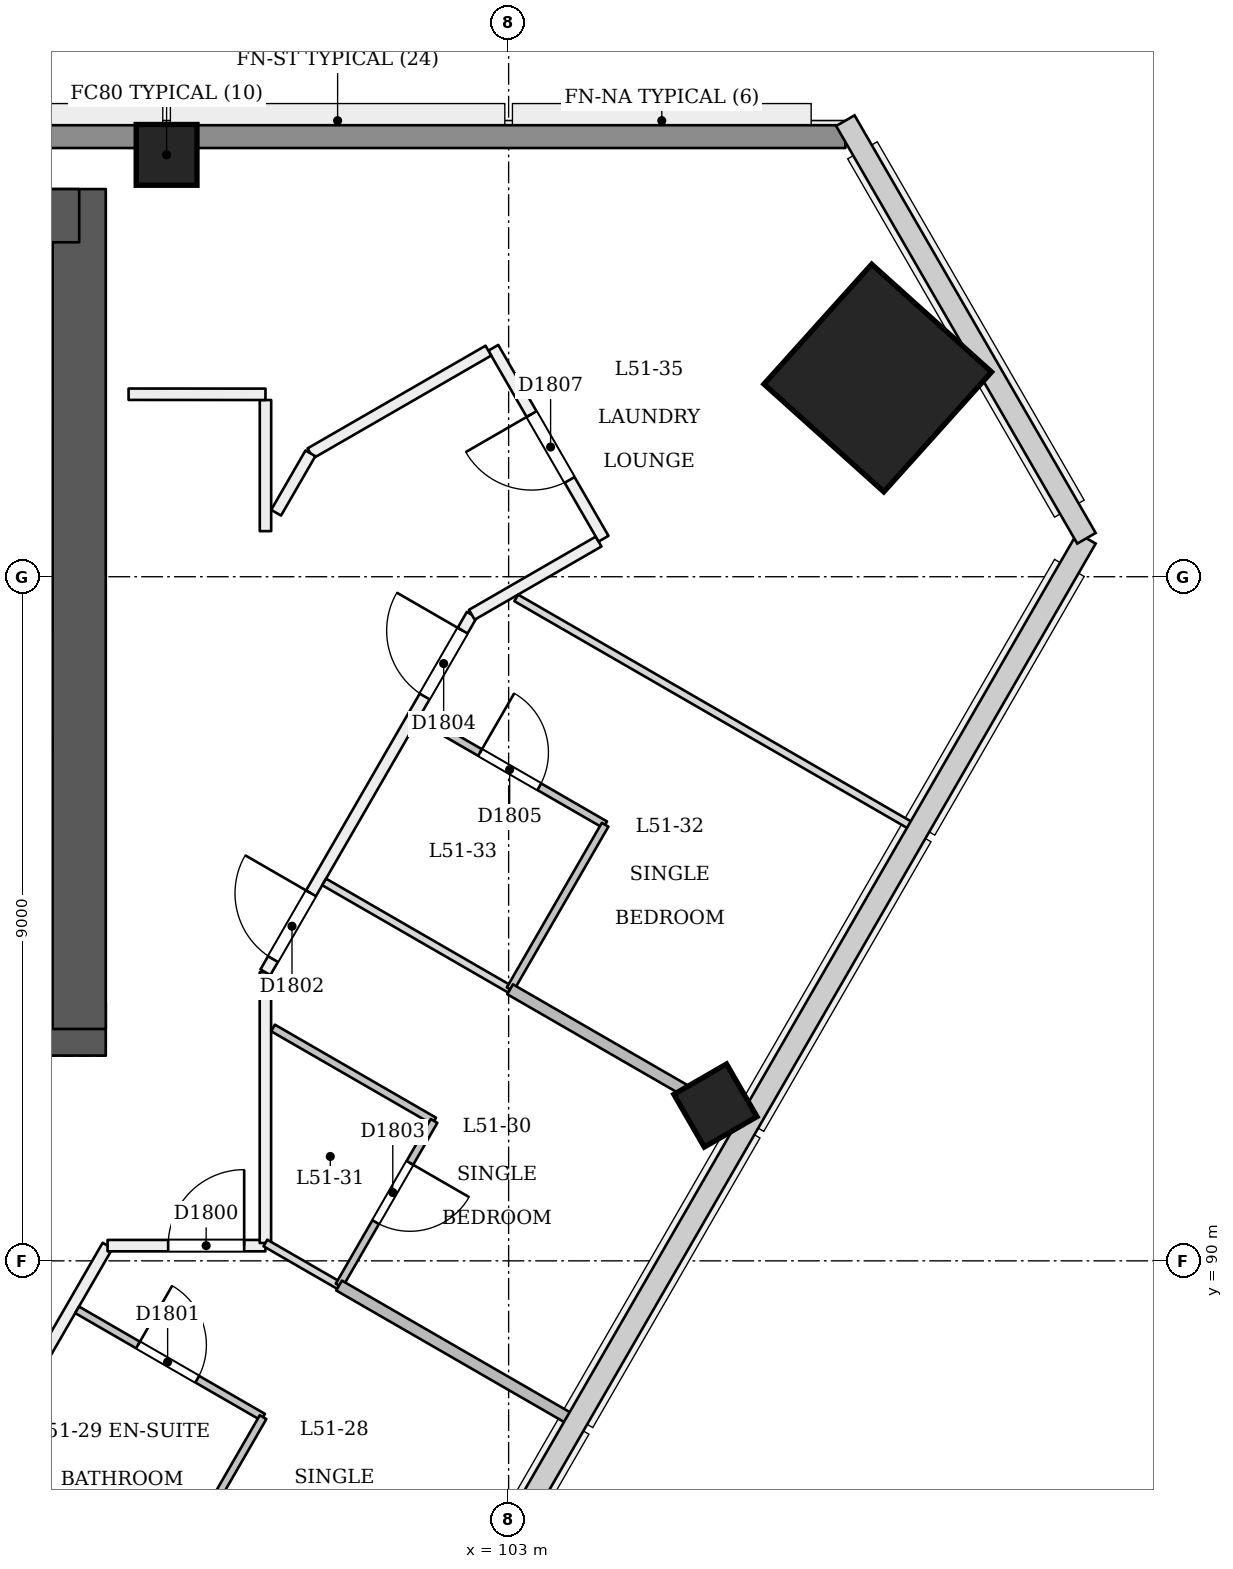
"""IFC4 building model, lengths in metres.
Left out: names, types, materials, properties, quantities, classifications, styles, units other than length and angle.
Written with IfcOpenShell. Run it as: python <this file> out.ifc"""

import sys

from ifc_helpers import new_model, si_unit, direction, frame, frame_2d, origin, origin_2d, place, context, subcontext, project, spatial, rectangle, extrude, element, fill, save


model = new_model("IFC4")
c1 = context("Model", 3, precision=1e-05, world=origin(), true_north=direction((0.0, 1.0)))
c2 = subcontext(c1, "Body", "Model", "MODEL_VIEW")
j1 = project(units=[si_unit("LENGTHUNIT", "METRE"), si_unit("PLANEANGLEUNIT", "RADIAN")], contexts=[c1])
p1 = place(None, origin())
s1 = spatial("IfcSite", under=j1, at=p1, CompositionType="ELEMENT")
p2 = place(p1, origin())
s2 = spatial("IfcBuilding", under=s1, at=p2, CompositionType="ELEMENT")
p3 = place(p2, frame((0.0, 0.0, 198.0)))
s3 = spatial("IfcBuildingStorey", under=s2, at=p3, CompositionType="ELEMENT", Elevation=198.0)
p4 = place(p3, frame((72.65, 93.05, 0.0), z_axis=(0.0, 0.0, 1.0), x_axis=(1.0, 0.0, 0.0)))
e1 = element("IfcWall", 1, at=p4, inside=s3, PredefinedType="SHEAR", context=c2, shape_type="SweptSolid", body=[
    extrude(rectangle(XDim=25.05, YDim=0.7, at=frame_2d((12.525, 0.0))), origin(), (0.0, 0.0, 1.0), 3.6),
])
p5 = place(p4, frame((1.15, 0.0, 0.0)))
e2 = element("IfcOpeningElement", 2, at=p5, cuts=e1, PredefinedType="OPENING", context=c2, shape_type="SweptSolid", body=[
    extrude(rectangle(XDim=1.2, YDim=2.1, at=frame_2d((0.6, 1.05))), frame((0.0, 0.36, 0.0), z_axis=(0.0, -1.0, 0.0), x_axis=(1.0, 0.0, 0.0)), (0.0, 0.0, 1.0), 0.721),
])
p6 = place(p4, frame((3.35, 0.0, 0.0)))
e3 = element("IfcOpeningElement", 3, at=p6, cuts=e1, PredefinedType="OPENING", context=c2, shape_type="SweptSolid", body=[
    extrude(rectangle(XDim=1.2, YDim=2.1, at=frame_2d((0.6, 1.05))), frame((0.0, 0.36, 0.0), z_axis=(0.0, -1.0, 0.0), x_axis=(1.0, 0.0, 0.0)), (0.0, 0.0, 1.0), 0.721),
])
p7 = place(p4, frame((13.35, 0.0, 0.0)))
e4 = element("IfcOpeningElement", 4, at=p7, cuts=e1, PredefinedType="OPENING", context=c2, shape_type="SweptSolid", body=[
    extrude(rectangle(XDim=1.2, YDim=2.1, at=frame_2d((0.6, 1.05))), frame((0.0, 0.36, 0.0), z_axis=(0.0, -1.0, 0.0), x_axis=(1.0, 0.0, 0.0)), (0.0, 0.0, 1.0), 0.721),
])
p8 = place(p4, frame((15.812, 0.0, 0.0)))
e5 = element("IfcOpeningElement", 5, at=p8, cuts=e1, PredefinedType="OPENING", context=c2, shape_type="SweptSolid", body=[
    extrude(rectangle(XDim=1.0, YDim=2.1, at=frame_2d((0.5, 1.05))), frame((0.0, 0.36, 0.0), z_axis=(0.0, -1.0, 0.0), x_axis=(1.0, 0.0, 0.0)), (0.0, 0.0, 1.0), 0.721),
])
p9 = place(p4, frame((18.25, 0.0, 0.0)))
e6 = element("IfcOpeningElement", 6, at=p9, cuts=e1, PredefinedType="OPENING", context=c2, shape_type="SweptSolid", body=[
    extrude(rectangle(XDim=1.0, YDim=2.1, at=frame_2d((0.5, 1.05))), frame((0.0, 0.36, 0.0), z_axis=(0.0, -1.0, 0.0), x_axis=(1.0, 0.0, 0.0)), (0.0, 0.0, 1.0), 0.721),
])
p10 = place(p4, frame((20.6, 0.0, 0.0)))
e7 = element("IfcOpeningElement", 7, at=p10, cuts=e1, PredefinedType="OPENING", context=c2, shape_type="SweptSolid", body=[
    extrude(rectangle(XDim=1.0, YDim=2.1, at=frame_2d((0.5, 1.05))), frame((0.0, 0.36, 0.0), z_axis=(0.0, -1.0, 0.0), x_axis=(1.0, 0.0, 0.0)), (0.0, 0.0, 1.0), 0.721),
])
p11 = place(p4, frame((22.887, 0.0, 0.0)))
e8 = element("IfcOpeningElement", 8, at=p11, cuts=e1, PredefinedType="OPENING", context=c2, shape_type="SweptSolid", body=[
    extrude(rectangle(XDim=1.0, YDim=2.1, at=frame_2d((0.5, 1.05))), frame((0.0, 0.36, 0.0), z_axis=(0.0, -1.0, 0.0), x_axis=(1.0, 0.0, 0.0)), (0.0, 0.0, 1.0), 0.721),
])
p12 = place(p3, frame((97.35, 93.05, 0.0), z_axis=(0.0, 0.0, 1.0), x_axis=(0.0, 1.0, 0.0)))
e9 = element("IfcWall", 9, at=p12, inside=s3, PredefinedType="SHEAR", context=c2, shape_type="SweptSolid", body=[
    extrude(rectangle(XDim=11.05, YDim=0.7, at=frame_2d((5.525, 0.0))), origin(), (0.0, 0.0, 1.0), 3.6),
])
p13 = place(p3, frame((97.35, 103.75, 0.0), z_axis=(0.0, 0.0, 1.0), x_axis=(-1.0, 0.0, 0.0)))
e10 = element("IfcWall", 10, at=p13, inside=s3, PredefinedType="SHEAR", context=c2, shape_type="SweptSolid", body=[
    extrude(rectangle(XDim=25.05, YDim=0.7, at=frame_2d((12.525, 0.0))), origin(), (0.0, 0.0, 1.0), 3.6),
])
p14 = place(p3, frame((107.89, 101.603, 0.0), z_axis=(-0.028401814599, 0.009218727412, 0.999554076572), x_axis=(0.50075235184, -0.865305630254, 0.022209195791)))
e11 = element("IfcColumn", 11, at=p14, inside=s3, PredefinedType="COLUMN", context=c2, shape_type="SweptSolid", body=[
    extrude(rectangle(XDim=2.12, YDim=2.12, at=origin_2d()), origin(), (0.0, 0.0, 1.0), 3.602),
])
p15 = place(p3, frame((98.5, 104.55, 0.0), z_axis=(0.0, 0.0, 1.0), x_axis=(1.0, 0.0, 0.0)))
e12 = element("IfcColumn", 12, at=p15, inside=s3, PredefinedType="COLUMN", context=c2, shape_type="SweptSolid", body=[
    extrude(rectangle(XDim=0.8, YDim=0.8, at=origin_2d()), origin(), (0.0, 0.0, 1.0), 3.6),
])
p16 = place(p3, frame((105.748, 91.996, -0.024), z_axis=(-0.022155133694, 0.038483534979, 0.999013597298), x_axis=(-0.501312932815, -0.864981144328, 0.022202777955)))
e13 = element("IfcColumn", 13, at=p16, inside=s3, PredefinedType="COLUMN", context=c2, shape_type="SweptSolid", body=[
    extrude(rectangle(XDim=0.8, YDim=0.8, at=origin_2d()), origin(), (0.0, 0.0, 1.0), 3.604),
])
p17 = place(p3, frame((85.758, 69.475, 0.0), z_axis=(0.0, 0.0, 1.0), x_axis=(0.500001211172, 0.866024704513, 0.0)))
e14 = element("IfcWall", 14, at=p17, inside=s3, PredefinedType="PARTITIONING", context=c2, shape_type="SweptSolid", body=[
    extrude(rectangle(XDim=23.932, YDim=0.15, at=frame_2d((11.966, 0.0))), origin(), (0.0, 0.0, 1.0), 2.75),
])
p18 = place(p17, frame((5.395, 0.0, 0.0)))
e15 = element("IfcOpeningElement", 15, at=p18, cuts=e14, PredefinedType="OPENING", context=c2, shape_type="SweptSolid", body=[
    extrude(rectangle(XDim=1.0, YDim=2.1, at=frame_2d((0.5, 1.05))), frame((0.0, 0.085, 0.0), z_axis=(0.0, -1.0, 0.0), x_axis=(1.0, 0.0, 0.0)), (0.0, 0.0, 1.0), 0.171),
])
p19 = place(p17, frame((7.72, 0.0, 0.0)))
e16 = element("IfcOpeningElement", 16, at=p19, cuts=e14, PredefinedType="OPENING", context=c2, shape_type="SweptSolid", body=[
    extrude(rectangle(XDim=1.0, YDim=2.1, at=frame_2d((0.5, 1.05))), frame((0.0, 0.085, 0.0), z_axis=(0.0, -1.0, 0.0), x_axis=(1.0, 0.0, 0.0)), (0.0, 0.0, 1.0), 0.171),
])
p20 = place(p17, frame((14.28, 0.0, 0.0)))
e17 = element("IfcOpeningElement", 17, at=p20, cuts=e14, PredefinedType="OPENING", context=c2, shape_type="SweptSolid", body=[
    extrude(rectangle(XDim=1.0, YDim=2.1, at=frame_2d((0.5, 1.05))), frame((0.0, 0.085, 0.0), z_axis=(0.0, -1.0, 0.0), x_axis=(1.0, 0.0, 0.0)), (0.0, 0.0, 1.0), 0.171),
])
p21 = place(p17, frame((16.605, 0.0, 0.0)))
e18 = element("IfcOpeningElement", 18, at=p21, cuts=e14, PredefinedType="OPENING", context=c2, shape_type="SweptSolid", body=[
    extrude(rectangle(XDim=1.0, YDim=2.1, at=frame_2d((0.5, 1.05))), frame((0.0, 0.085, 0.0), z_axis=(0.0, -1.0, 0.0), x_axis=(1.0, 0.0, 0.0)), (0.0, 0.0, 1.0), 0.171),
])
p22 = place(p3, frame((97.724, 90.2, 0.0), z_axis=(0.0, 0.0, 1.0), x_axis=(1.0, 0.0, 0.0)))
e19 = element("IfcWall", 19, at=p22, inside=s3, PredefinedType="PARTITIONING", context=c2, shape_type="SweptSolid", body=[
    extrude(rectangle(XDim=2.076, YDim=0.15, at=frame_2d((1.038, 0.0))), origin(), (0.0, 0.0, 1.0), 3.15),
])
p23 = place(p22, frame((0.797, 0.0, 0.0)))
e20 = element("IfcOpeningElement", 20, at=p23, cuts=e19, PredefinedType="OPENING", context=c2, shape_type="SweptSolid", body=[
    extrude(rectangle(XDim=1.0, YDim=2.1, at=frame_2d((0.5, 1.05))), frame((0.0, 0.085, 0.0), z_axis=(0.0, -1.0, 0.0), x_axis=(1.0, 0.0, 0.0)), (0.0, 0.0, 1.0), 0.171),
])
p24 = place(p3, frame((99.8, 90.235, 0.0), z_axis=(0.0, 0.0, 1.0), x_axis=(0.0, 1.0, 0.0)))
e21 = element("IfcWall", 21, at=p24, inside=s3, PredefinedType="PARTITIONING", context=c2, shape_type="SweptSolid", body=[
    extrude(rectangle(XDim=3.561, YDim=0.15, at=frame_2d((1.781, 0.0))), origin(), (0.0, 0.0, 1.0), 3.15),
])
p25 = place(p3, frame((99.8, 93.796, 0.0), z_axis=(0.0, 0.0, 1.0), x_axis=(0.499972772639, 0.866041122938, 0.0)))
e22 = element("IfcWall", 22, at=p25, inside=s3, PredefinedType="PARTITIONING", context=c2, shape_type="SweptSolid", body=[
    extrude(rectangle(XDim=5.431, YDim=0.15, at=frame_2d((2.716, 0.0))), origin(), (0.0, 0.0, 1.0), 3.15),
])
p26 = place(p25, frame((0.2, 0.0, 0.0)))
e23 = element("IfcOpeningElement", 23, at=p26, cuts=e22, PredefinedType="OPENING", context=c2, shape_type="SweptSolid", body=[
    extrude(rectangle(XDim=1.0, YDim=2.1, at=frame_2d((0.5, 1.05))), frame((0.0, 0.085, 0.0), z_axis=(0.0, -1.0, 0.0), x_axis=(1.0, 0.0, 0.0)), (0.0, 0.0, 1.0), 0.171),
])
p27 = place(p25, frame((4.19, 0.0, 0.0)))
e24 = element("IfcOpeningElement", 24, at=p27, cuts=e22, PredefinedType="OPENING", context=c2, shape_type="SweptSolid", body=[
    extrude(rectangle(XDim=1.0, YDim=2.1, at=frame_2d((0.5, 1.05))), frame((0.0, 0.085, 0.0), z_axis=(0.0, -1.0, 0.0), x_axis=(1.0, 0.0, 0.0)), (0.0, 0.0, 1.0), 0.171),
])
p28 = place(p3, frame((102.516, 98.5, 0.0), z_axis=(0.0, 0.0, 1.0), x_axis=(0.86605048973, 0.49995654735, 0.0)))
e25 = element("IfcWall", 25, at=p28, inside=s3, PredefinedType="PARTITIONING", context=c2, shape_type="SweptSolid", body=[
    extrude(rectangle(XDim=1.926, YDim=0.15, at=frame_2d((0.963, 0.0))), origin(), (0.0, 0.0, 1.0), 3.15),
])
p29 = place(p3, frame((104.249, 99.5, 0.0), z_axis=(0.0, 0.0, 1.0), x_axis=(-0.499987231761, 0.866032775405, 0.0)))
e26 = element("IfcWall", 26, at=p29, inside=s3, PredefinedType="PARTITIONING", context=c2, shape_type="SweptSolid", body=[
    extrude(rectangle(XDim=2.9, YDim=0.15, at=frame_2d((1.45, 0.0))), origin(), (0.0, 0.0, 1.0), 3.15),
])
p30 = place(p29, frame((0.893, 0.0, 0.0)))
e27 = element("IfcOpeningElement", 27, at=p30, cuts=e26, PredefinedType="OPENING", context=c2, shape_type="SweptSolid", body=[
    extrude(rectangle(XDim=1.0, YDim=2.1, at=frame_2d((0.5, 1.05))), frame((0.0, 0.085, 0.0), z_axis=(0.0, -1.0, 0.0), x_axis=(1.0, 0.0, 0.0)), (0.0, 0.0, 1.0), 0.171),
])
p31 = place(p3, frame((102.734, 101.975, 0.0), z_axis=(0.0, 0.0, 1.0), x_axis=(-0.866173556431, -0.499743304247, 0.0)))
e28 = element("IfcWall", 28, at=p31, inside=s3, PredefinedType="PARTITIONING", context=c2, shape_type="SweptSolid", body=[
    extrude(rectangle(XDim=2.703, YDim=0.15, at=frame_2d((1.352, 0.0))), origin(), (0.0, 0.0, 1.0), 3.15),
])
p32 = place(p3, frame((100.392, 100.624, 0.0), z_axis=(0.0, 0.0, 1.0), x_axis=(-0.500182949555, -0.865919752041, 0.0)))
e29 = element("IfcWall", 29, at=p32, inside=s3, PredefinedType="PARTITIONING", context=c2, shape_type="SweptSolid", body=[
    extrude(rectangle(XDim=0.903, YDim=0.15, at=frame_2d((0.451, 0.0))), origin(), (0.0, 0.0, 1.0), 3.15),
])
p33 = place(p3, frame((99.801, 99.6, 0.0), z_axis=(0.0, 0.0, 1.0), x_axis=(0.0, 1.0, 0.0)))
e30 = element("IfcWall", 30, at=p33, inside=s3, PredefinedType="PARTITIONING", context=c2, shape_type="SweptSolid", body=[
    extrude(rectangle(XDim=1.725, YDim=0.15, at=frame_2d((0.863, 0.0))), origin(), (0.0, 0.0, 1.0), 3.15),
])
p34 = place(p3, frame((99.801, 101.4, 0.0), z_axis=(0.0, 0.0, 1.0), x_axis=(-0.999999852996, 0.000542225757, 0.0)))
e31 = element("IfcWall", 31, at=p34, inside=s3, PredefinedType="PARTITIONING", context=c2, shape_type="SweptSolid", body=[
    extrude(rectangle(XDim=1.801, YDim=0.15, at=frame_2d((0.9, 0.0))), origin(), (0.0, 0.0, 1.0), 3.15),
])
p35 = place(p3, frame((98.519, 85.778, 0.0), z_axis=(0.0, 0.0, 1.0), x_axis=(-0.866011447264, 0.500024172624, 0.0)))
e32 = element("IfcWall", 32, at=p35, inside=s3, PredefinedType="PARTITIONING", context=c2, shape_type="SweptSolid", body=[
    extrude(rectangle(XDim=2.825, YDim=0.1, at=frame_2d((1.413, 0.0))), origin(), (0.0, 0.0, 1.0), 2.75),
])
p36 = place(p3, frame((97.323, 89.356, 0.0), z_axis=(0.0, 0.0, 1.0), x_axis=(0.866011447264, -0.500024172624, 0.0)))
e33 = element("IfcWall", 33, at=p36, inside=s3, PredefinedType="PARTITIONING", context=c2, shape_type="SweptSolid", body=[
    extrude(rectangle(XDim=2.825, YDim=0.1, at=frame_2d((1.413, 0.0))), origin(), (0.0, 0.0, 1.0), 3.15),
])
p37 = place(p36, frame((0.925, 0.0, 0.0)))
e34 = element("IfcOpeningElement", 34, at=p37, cuts=e33, PredefinedType="OPENING", context=c2, shape_type="SweptSolid", body=[
    extrude(rectangle(XDim=0.9, YDim=2.1, at=frame_2d((0.45, 1.05))), frame((0.0, 0.061, 0.0), z_axis=(0.0, -1.0, 0.0), x_axis=(1.0, 0.0, 0.0)), (0.0, 0.0, 1.0), 0.121),
])
p38 = place(p3, frame((99.769, 87.943, 0.0), z_axis=(0.0, 0.0, 1.0), x_axis=(-0.500004234368, -0.866022959057, 0.0)))
e35 = element("IfcWall", 35, at=p38, inside=s3, PredefinedType="PARTITIONING", context=c2, shape_type="SweptSolid", body=[
    extrude(rectangle(XDim=2.5, YDim=0.1, at=frame_2d((1.25, 0.0))), origin(), (0.0, 0.0, 1.0), 2.75),
])
p39 = place(p3, frame((103.818, 87.915, 0.0), z_axis=(0.0, 0.0, 1.0), x_axis=(-0.866036599697, 0.499980607609, 0.0)))
e36 = element("IfcWall", 36, at=p39, inside=s3, PredefinedType="PARTITIONING", context=c2, shape_type="SweptSolid", body=[
    extrude(rectangle(XDim=3.52, YDim=0.15, at=frame_2d((1.76, 0.0))), origin(), (0.0, 0.0, 1.0), 2.65),
])
p40 = place(p3, frame((100.769, 89.675, 0.0), z_axis=(0.0, 0.0, 1.0), x_axis=(-0.865938551386, 0.500150402602, 0.0)))
e37 = element("IfcWall", 37, at=p40, inside=s3, PredefinedType="PARTITIONING", context=c2, shape_type="SweptSolid", body=[
    extrude(rectangle(XDim=1.119, YDim=0.1, at=frame_2d((0.56, 0.0))), origin(), (0.0, 0.0, 1.0), 3.15),
])
p41 = place(p3, frame((99.9, 93.064, 0.0), z_axis=(0.0, 0.0, 1.0), x_axis=(0.866067636663, -0.499926843373, 0.0)))
e38 = element("IfcWall", 38, at=p41, inside=s3, PredefinedType="PARTITIONING", context=c2, shape_type="SweptSolid", body=[
    extrude(rectangle(XDim=2.447, YDim=0.1, at=frame_2d((1.224, 0.0))), origin(), (0.0, 0.0, 1.0), 3.15),
])
p42 = place(p3, frame((102.019, 91.84, 0.0), z_axis=(0.0, 0.0, 1.0), x_axis=(-0.499961950354, -0.866047370643, 0.0)))
e39 = element("IfcWall", 39, at=p42, inside=s3, PredefinedType="PARTITIONING", context=c2, shape_type="SweptSolid", body=[
    extrude(rectangle(XDim=2.5, YDim=0.1, at=frame_2d((1.25, 0.0))), origin(), (0.0, 0.0, 1.0), 3.15),
])
p43 = place(p42, frame((0.637, 0.0, 0.0)))
e40 = element("IfcOpeningElement", 40, at=p43, cuts=e39, PredefinedType="OPENING", context=c2, shape_type="SweptSolid", body=[
    extrude(rectangle(XDim=0.9, YDim=2.1, at=frame_2d((0.45, 1.05))), frame((0.0, 0.061, 0.0), z_axis=(0.0, -1.0, 0.0), x_axis=(1.0, 0.0, 0.0)), (0.0, 0.0, 1.0), 0.121),
])
p44 = place(p3, frame((106.051, 91.822, 0.0), z_axis=(0.0, 0.0, 1.0), x_axis=(-0.866036909293, 0.499980071345, 0.0)))
e41 = element("IfcWall", 41, at=p44, inside=s3, PredefinedType="PARTITIONING", context=c2, shape_type="SweptSolid", body=[
    extrude(rectangle(XDim=3.5, YDim=0.15, at=frame_2d((1.75, 0.0))), origin(), (0.0, 0.0, 1.0), 2.65),
])
p45 = place(p3, frame((103.019, 93.572, 0.0), z_axis=(0.0, 0.0, 1.0), x_axis=(-0.866011447264, 0.500024172624, 0.0)))
e42 = element("IfcWall", 42, at=p45, inside=s3, PredefinedType="PARTITIONING", context=c2, shape_type="SweptSolid", body=[
    extrude(rectangle(XDim=2.825, YDim=0.1, at=frame_2d((1.413, 0.0))), origin(), (0.0, 0.0, 1.0), 3.15),
])
p46 = place(p3, frame((101.823, 97.15, 0.0), z_axis=(0.0, 0.0, 1.0), x_axis=(0.866011447264, -0.500024172624, 0.0)))
e43 = element("IfcWall", 43, at=p46, inside=s3, PredefinedType="PARTITIONING", context=c2, shape_type="SweptSolid", body=[
    extrude(rectangle(XDim=2.825, YDim=0.1, at=frame_2d((1.413, 0.0))), origin(), (0.0, 0.0, 1.0), 3.15),
])
p47 = place(p46, frame((0.925, 0.0, 0.0)))
e44 = element("IfcOpeningElement", 44, at=p47, cuts=e43, PredefinedType="OPENING", context=c2, shape_type="SweptSolid", body=[
    extrude(rectangle(XDim=0.9, YDim=2.1, at=frame_2d((0.45, 1.05))), frame((0.0, 0.061, 0.0), z_axis=(0.0, -1.0, 0.0), x_axis=(1.0, 0.0, 0.0)), (0.0, 0.0, 1.0), 0.121),
])
p48 = place(p3, frame((104.269, 95.737, 0.0), z_axis=(0.0, 0.0, 1.0), x_axis=(-0.500004234368, -0.866022959057, 0.0)))
e45 = element("IfcWall", 45, at=p48, inside=s3, PredefinedType="PARTITIONING", context=c2, shape_type="SweptSolid", body=[
    extrude(rectangle(XDim=2.5, YDim=0.1, at=frame_2d((1.25, 0.0))), origin(), (0.0, 0.0, 1.0), 3.15),
])
p49 = place(p3, frame((108.318, 95.709, 0.0), z_axis=(0.0, 0.0, 1.0), x_axis=(-0.866010137527, 0.500026441001, 0.0)))
e46 = element("IfcWall", 46, at=p49, inside=s3, PredefinedType="PARTITIONING", context=c2, shape_type="SweptSolid", body=[
    extrude(rectangle(XDim=6.025, YDim=0.1, at=frame_2d((3.013, 0.0))), origin(), (0.0, 0.0, 1.0), 2.65),
])
p50 = place(p3, frame((62.57, 104.79, 0.0), z_axis=(0.0, 0.0, 1.0), x_axis=(1.0, 0.0, 0.0)))
e47 = element("IfcWall", 47, at=p50, inside=s3, PredefinedType="SOLIDWALL", context=c2, shape_type="SweptSolid", body=[
    extrude(rectangle(XDim=44.86, YDim=0.3, at=frame_2d((22.43, 0.0))), origin(), (0.0, 0.0, 1.0), 2.65),
])
p51 = place(p23, origin())
e48 = element("IfcDoor", 48, at=p51, inside=s3, OperationType="SINGLE_SWING_RIGHT", PredefinedType="NOTDEFINED", context=c2, shape_type="SweptSolid", body=[
    extrude(rectangle(XDim=1.0, YDim=2.1, at=frame_2d((0.5, 1.05))), frame((0.0, 0.025, 0.0), z_axis=(0.0, -1.0, 0.0), x_axis=(1.0, 0.0, 0.0)), (0.0, 0.0, 1.0), 0.05),
])
fill(e20, e48)
p52 = place(p37, origin())
e49 = element("IfcDoor", 49, at=p52, inside=s3, OperationType="SINGLE_SWING_LEFT", PredefinedType="NOTDEFINED", context=c2, shape_type="SweptSolid", body=[
    extrude(rectangle(XDim=0.9, YDim=2.1, at=frame_2d((0.45, 1.05))), frame((0.0, 0.025, 0.0), z_axis=(0.0, -1.0, 0.0), x_axis=(1.0, 0.0, 0.0)), (0.0, 0.0, 1.0), 0.05),
])
fill(e34, e49)
p53 = place(p26, origin())
e50 = element("IfcDoor", 50, at=p53, inside=s3, OperationType="SINGLE_SWING_RIGHT", PredefinedType="NOTDEFINED", context=c2, shape_type="SweptSolid", body=[
    extrude(rectangle(XDim=1.0, YDim=2.1, at=frame_2d((0.5, 1.05))), frame((0.0, 0.025, 0.0), z_axis=(0.0, -1.0, 0.0), x_axis=(1.0, 0.0, 0.0)), (0.0, 0.0, 1.0), 0.05),
])
fill(e23, e50)
p54 = place(p43, origin())
e51 = element("IfcDoor", 51, at=p54, inside=s3, OperationType="SINGLE_SWING_LEFT", PredefinedType="NOTDEFINED", context=c2, shape_type="SweptSolid", body=[
    extrude(rectangle(XDim=0.9, YDim=2.1, at=frame_2d((0.45, 1.05))), frame((0.0, 0.025, 0.0), z_axis=(0.0, -1.0, 0.0), x_axis=(1.0, 0.0, 0.0)), (0.0, 0.0, 1.0), 0.05),
])
fill(e40, e51)
p55 = place(p27, origin())
e52 = element("IfcDoor", 52, at=p55, inside=s3, OperationType="SINGLE_SWING_RIGHT", PredefinedType="NOTDEFINED", context=c2, shape_type="SweptSolid", body=[
    extrude(rectangle(XDim=1.0, YDim=2.1, at=frame_2d((0.5, 1.05))), frame((0.0, 0.025, 0.0), z_axis=(0.0, -1.0, 0.0), x_axis=(1.0, 0.0, 0.0)), (0.0, 0.0, 1.0), 0.05),
])
fill(e24, e52)
p56 = place(p47, origin())
e53 = element("IfcDoor", 53, at=p56, inside=s3, OperationType="SINGLE_SWING_LEFT", PredefinedType="NOTDEFINED", context=c2, shape_type="SweptSolid", body=[
    extrude(rectangle(XDim=0.9, YDim=2.1, at=frame_2d((0.45, 1.05))), frame((0.0, 0.025, 0.0), z_axis=(0.0, -1.0, 0.0), x_axis=(1.0, 0.0, 0.0)), (0.0, 0.0, 1.0), 0.05),
])
fill(e44, e53)
p57 = place(p30, origin())
e54 = element("IfcDoor", 54, at=p57, inside=s3, OperationType="SINGLE_SWING_RIGHT", PredefinedType="NOTDEFINED", context=c2, shape_type="SweptSolid", body=[
    extrude(rectangle(XDim=1.0, YDim=2.1, at=frame_2d((0.5, 1.05))), frame((0.0, 0.025, 0.0), z_axis=(0.0, -1.0, 0.0), x_axis=(1.0, 0.0, 0.0)), (0.0, 0.0, 1.0), 0.05),
])
fill(e27, e54)
save(model, sys.argv[1])
